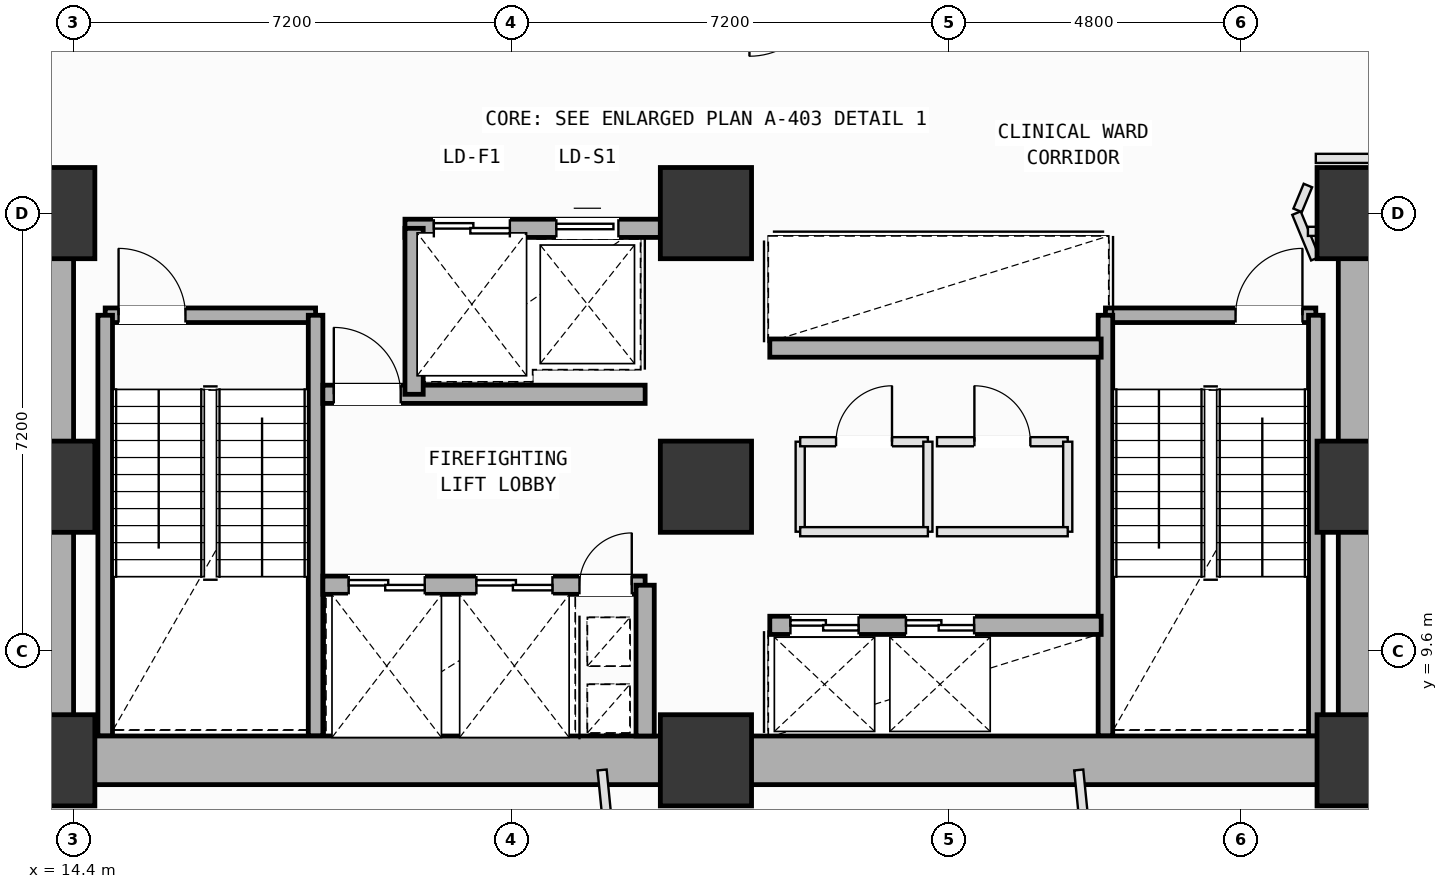
"""IFC4 building model, lengths in metres.
Left out: names, types, materials, properties, quantities, classifications, styles, units other than length and angle.
Written with IfcOpenShell. Run it as: python <this file> out.ifc"""

import sys

from ifc_helpers import new_model, si_unit, direction, frame, frame_2d, origin, origin_2d, place, context, subcontext, project, spatial, rectangle, extrude, element, fill, save


model = new_model("IFC4")
c1 = context("Model", 3, precision=1e-05, world=origin(), true_north=direction((0.0, 1.0)))
c2 = subcontext(c1, "Body", "Model", "MODEL_VIEW")
j1 = project(units=[si_unit("LENGTHUNIT", "METRE"), si_unit("PLANEANGLEUNIT", "RADIAN")], contexts=[c1])
p1 = place(None, origin())
s1 = spatial("IfcSite", under=j1, at=p1, CompositionType="ELEMENT")
p2 = place(p1, origin())
s2 = spatial("IfcBuilding", under=s1, at=p2, CompositionType="ELEMENT")
p3 = place(p2, frame((0.0, 0.0, 47.0)))
s3 = spatial("IfcBuildingStorey", under=s2, at=p3, CompositionType="ELEMENT", Elevation=47.0)
for number, where, z_axis, x_axis in (
    (1, (14.0, 7.8, 0.0), (0.0, 0.0, 1.0), (1.0, 0.0, 0.0)),
    (2, (14.0, 12.3, 0.0), (0.0, 0.0, 1.0), (1.0, 0.0, 0.0)),
    (3, (14.0, 16.8, 0.0), (0.0, 0.0, 1.0), (1.0, 0.0, 0.0)),
    (4, (24.8, 7.8, 0.0), (0.0, 0.0, 1.0), (1.0, 0.0, 0.0)),
    (5, (24.8, 12.3, 0.0), (0.0, 0.0, 1.0), (1.0, 0.0, 0.0)),
    (6, (24.8, 16.8, 0.0), (0.0, 0.0, 1.0), (1.0, 0.0, 0.0)),
    (7, (35.6, 7.8, 0.0), (0.0, 0.0, 1.0), (1.0, 0.0, 0.0)),
    (8, (35.6, 12.3, 0.0), (0.0, 0.0, 1.0), (1.0, 0.0, 0.0)),
    (9, (35.6, 16.8, 0.0), (0.0, 0.0, 1.0), (1.0, 0.0, 0.0)),
):
    element("IfcColumn", number, at=place(p3, frame(where, z_axis=z_axis, x_axis=x_axis)), inside=s3, PredefinedType="COLUMN", context=c2, shape_type="SweptSolid", body=[
        extrude(rectangle(XDim=1.5, YDim=1.5, at=origin_2d()), origin(), (0.0, 0.0, 1.0), 4.0),
    ])
p4 = place(p3, frame((14.92, 15.12, 0.0), z_axis=(0.0, 0.0, 1.0), x_axis=(1.0, 0.0, 0.0)))
e10 = element("IfcWall", 10, at=p4, inside=s3, PredefinedType="SOLIDWALL", context=c2, shape_type="SweptSolid", body=[
    extrude(rectangle(XDim=3.46, YDim=0.24, at=frame_2d((1.73, 0.0))), origin(), (0.0, 0.0, 1.0), 3.78),
])
p5 = place(p4, frame((0.22, 0.0, 0.0)))
e11 = element("IfcOpeningElement", 11, at=p5, cuts=e10, PredefinedType="OPENING", context=c2, shape_type="SweptSolid", body=[
    extrude(rectangle(XDim=1.1, YDim=2.15, at=frame_2d((0.55, 1.075))), frame((0.0, 0.13, 0.0), z_axis=(0.0, -1.0, 0.0), x_axis=(1.0, 0.0, 0.0)), (0.0, 0.0, 1.0), 0.26),
])
for number, where, z_axis, x_axis in (
    (12, (18.38, 15.12, 0.0), (0.0, 0.0, 1.0), (0.0, -1.0, 0.0)),
    (13, (14.92, 8.2, 0.0), (0.0, 0.0, 1.0), (0.0, 1.0, 0.0)),
):
    element("IfcWall", number, at=place(p3, frame(where, z_axis=z_axis, x_axis=x_axis)), inside=s3, PredefinedType="SOLIDWALL", context=c2, shape_type="SweptSolid", body=[
        extrude(rectangle(XDim=6.92, YDim=0.24, at=frame_2d((3.46, 0.0))), origin(), (0.0, 0.0, 1.0), 3.78),
    ])
p6 = place(p3, frame((31.37, 15.12, 0.0), z_axis=(0.0, 0.0, 1.0), x_axis=(1.0, 0.0, 0.0)))
e14 = element("IfcWall", 14, at=p6, inside=s3, PredefinedType="SOLIDWALL", context=c2, shape_type="SweptSolid", body=[
    extrude(rectangle(XDim=3.46, YDim=0.24, at=frame_2d((1.73, 0.0))), origin(), (0.0, 0.0, 1.0), 3.78),
])
p7 = place(p6, frame((2.14, 0.0, 0.0)))
e15 = element("IfcOpeningElement", 15, at=p7, cuts=e14, PredefinedType="OPENING", context=c2, shape_type="SweptSolid", body=[
    extrude(rectangle(XDim=1.1, YDim=2.15, at=frame_2d((0.55, 1.075))), frame((0.0, 0.13, 0.0), z_axis=(0.0, -1.0, 0.0), x_axis=(1.0, 0.0, 0.0)), (0.0, 0.0, 1.0), 0.26),
])
for number, where, z_axis, x_axis in (
    (16, (34.83, 15.12, 0.0), (0.0, 0.0, 1.0), (0.0, -1.0, 0.0)),
    (17, (31.37, 8.2, 0.0), (0.0, 0.0, 1.0), (0.0, 1.0, 0.0)),
):
    element("IfcWall", number, at=place(p3, frame(where, z_axis=z_axis, x_axis=x_axis)), inside=s3, PredefinedType="SOLIDWALL", context=c2, shape_type="SweptSolid", body=[
        extrude(rectangle(XDim=6.92, YDim=0.24, at=frame_2d((3.46, 0.0))), origin(), (0.0, 0.0, 1.0), 3.78),
    ])
for number, where, z_axis, x_axis in (
    (18, (14.0, 7.8, 0.0), (0.0, 0.0, 1.0), (1.0, 0.0, 0.0)),
    (19, (24.8, 7.8, 0.0), (0.0, 0.0, 1.0), (1.0, 0.0, 0.0)),
):
    element("IfcWall", number, at=place(p3, frame(where, z_axis=z_axis, x_axis=x_axis)), inside=s3, PredefinedType="SHEAR", context=c2, shape_type="SweptSolid", body=[
        extrude(rectangle(XDim=10.8, YDim=0.8, at=frame_2d((5.4, 0.0))), origin(), (0.0, 0.0, 1.0), 3.78),
    ])
for number, where, z_axis, x_axis in (
    (20, (35.6, 7.8, 0.0), (0.0, 0.0, 1.0), (0.0, 1.0, 0.0)),
    (21, (14.0, 16.8, 0.0), (0.0, 0.0, 1.0), (0.0, -1.0, 0.0)),
):
    element("IfcWall", number, at=place(p3, frame(where, z_axis=z_axis, x_axis=x_axis)), inside=s3, PredefinedType="SHEAR", context=c2, shape_type="SweptSolid", body=[
        extrude(rectangle(XDim=9.0, YDim=0.8, at=frame_2d((4.5, 0.0))), origin(), (0.0, 0.0, 1.0), 3.78),
    ])
p8 = place(p3, frame((19.85, 16.55, 0.0), z_axis=(0.0, 0.0, 1.0), x_axis=(1.0, 0.0, 0.0)))
e22 = element("IfcWall", 22, at=p8, inside=s3, PredefinedType="SOLIDWALL", context=c2, shape_type="SweptSolid", body=[
    extrude(rectangle(XDim=4.2, YDim=0.3, at=frame_2d((2.1, 0.0))), origin(), (0.0, 0.0, 1.0), 3.78),
])
p9 = place(p8, frame((0.475, 0.0, 0.0)))
e23 = element("IfcOpeningElement", 23, at=p9, cuts=e22, PredefinedType="OPENING", context=c2, shape_type="SweptSolid", body=[
    extrude(rectangle(XDim=1.25, YDim=2.18, at=frame_2d((0.625, 1.09))), frame((0.0, 0.16, 0.0), z_axis=(0.0, -1.0, 0.0), x_axis=(1.0, 0.0, 0.0)), (0.0, 0.0, 1.0), 0.32),
])
p10 = place(p8, frame((2.49, 0.0, 0.0)))
e24 = element("IfcOpeningElement", 24, at=p10, cuts=e22, PredefinedType="OPENING", context=c2, shape_type="SweptSolid", body=[
    extrude(rectangle(XDim=1.02, YDim=2.12, at=frame_2d((0.51, 1.06))), frame((0.0, 0.16, 0.0), z_axis=(0.0, -1.0, 0.0), x_axis=(1.0, 0.0, 0.0)), (0.0, 0.0, 1.0), 0.32),
])
p11 = place(p3, frame((18.5, 10.68, 0.0), z_axis=(0.0, 0.0, 1.0), x_axis=(1.0, 0.0, 0.0)))
e25 = element("IfcWall", 25, at=p11, inside=s3, PredefinedType="SOLIDWALL", context=c2, shape_type="SweptSolid", body=[
    extrude(rectangle(XDim=5.3, YDim=0.3, at=frame_2d((2.65, 0.0))), origin(), (0.0, 0.0, 1.0), 3.78),
])
p12 = place(p11, frame((4.22, 0.0, 0.0)))
e26 = element("IfcOpeningElement", 26, at=p12, cuts=e25, PredefinedType="OPENING", context=c2, shape_type="SweptSolid", body=[
    extrude(rectangle(XDim=0.86, YDim=2.06, at=frame_2d((0.43, 1.03))), frame((0.0, 0.16, 0.0), z_axis=(0.0, -1.0, 0.0), x_axis=(1.0, 0.0, 0.0)), (0.0, 0.0, 1.0), 0.32),
])
p13 = place(p11, frame((0.425, 0.0, 0.0)))
e27 = element("IfcOpeningElement", 27, at=p13, cuts=e25, PredefinedType="OPENING", context=c2, shape_type="SweptSolid", body=[
    extrude(rectangle(XDim=1.25, YDim=2.18, at=frame_2d((0.625, 1.09))), frame((0.0, 0.16, 0.0), z_axis=(0.0, -1.0, 0.0), x_axis=(1.0, 0.0, 0.0)), (0.0, 0.0, 1.0), 0.32),
])
p14 = place(p11, frame((2.525, 0.0, 0.0)))
e28 = element("IfcOpeningElement", 28, at=p14, cuts=e25, PredefinedType="OPENING", context=c2, shape_type="SweptSolid", body=[
    extrude(rectangle(XDim=1.25, YDim=2.18, at=frame_2d((0.625, 1.09))), frame((0.0, 0.16, 0.0), z_axis=(0.0, -1.0, 0.0), x_axis=(1.0, 0.0, 0.0)), (0.0, 0.0, 1.0), 0.32),
])
p15 = place(p3, frame((18.5, 13.82, 0.0), z_axis=(0.0, 0.0, 1.0), x_axis=(1.0, 0.0, 0.0)))
e29 = element("IfcWall", 29, at=p15, inside=s3, PredefinedType="SOLIDWALL", context=c2, shape_type="SweptSolid", body=[
    extrude(rectangle(XDim=5.3, YDim=0.3, at=frame_2d((2.65, 0.0))), origin(), (0.0, 0.0, 1.0), 3.78),
])
p16 = place(p15, frame((0.18, 0.0, 0.0)))
e30 = element("IfcOpeningElement", 30, at=p16, cuts=e29, PredefinedType="OPENING", context=c2, shape_type="SweptSolid", body=[
    extrude(rectangle(XDim=1.1, YDim=2.15, at=frame_2d((0.55, 1.075))), frame((0.0, 0.16, 0.0), z_axis=(0.0, -1.0, 0.0), x_axis=(1.0, 0.0, 0.0)), (0.0, 0.0, 1.0), 0.32),
])
p17 = place(p3, frame((23.8, 8.2, 0.0), z_axis=(0.0, 0.0, 1.0), x_axis=(0.0, 1.0, 0.0)))
e31 = element("IfcWall", 31, at=p17, inside=s3, PredefinedType="SOLIDWALL", context=c2, shape_type="SweptSolid", body=[
    extrude(rectangle(XDim=2.48, YDim=0.3, at=frame_2d((1.24, 0.0))), origin(), (0.0, 0.0, 1.0), 3.78),
])
p18 = place(p3, frame((20.0, 13.82, 0.0), z_axis=(0.0, 0.0, 1.0), x_axis=(0.0, 1.0, 0.0)))
e32 = element("IfcWall", 32, at=p18, inside=s3, PredefinedType="SOLIDWALL", context=c2, shape_type="SweptSolid", body=[
    extrude(rectangle(XDim=2.73, YDim=0.3, at=frame_2d((1.365, 0.0))), origin(), (0.0, 0.0, 1.0), 3.78),
])
p19 = place(p3, frame((25.85, 10.02, 0.0), z_axis=(0.0, 0.0, 1.0), x_axis=(1.0, 0.0, 0.0)))
e33 = element("IfcWall", 33, at=p19, inside=s3, PredefinedType="SOLIDWALL", context=c2, shape_type="SweptSolid", body=[
    extrude(rectangle(XDim=5.45, YDim=0.3, at=frame_2d((2.725, 0.0))), origin(), (0.0, 0.0, 1.0), 3.78),
])
p20 = place(p19, frame((0.34, 0.0, 0.0)))
e34 = element("IfcOpeningElement", 34, at=p20, cuts=e33, PredefinedType="OPENING", context=c2, shape_type="SweptSolid", body=[
    extrude(rectangle(XDim=1.12, YDim=2.15, at=frame_2d((0.56, 1.075))), frame((0.0, 0.16, 0.0), z_axis=(0.0, -1.0, 0.0), x_axis=(1.0, 0.0, 0.0)), (0.0, 0.0, 1.0), 0.32),
])
p21 = place(p19, frame((2.24, 0.0, 0.0)))
e35 = element("IfcOpeningElement", 35, at=p21, cuts=e33, PredefinedType="OPENING", context=c2, shape_type="SweptSolid", body=[
    extrude(rectangle(XDim=1.12, YDim=2.15, at=frame_2d((0.56, 1.075))), frame((0.0, 0.16, 0.0), z_axis=(0.0, -1.0, 0.0), x_axis=(1.0, 0.0, 0.0)), (0.0, 0.0, 1.0), 0.32),
])
p22 = place(p3, frame((25.85, 14.58, 0.0), z_axis=(0.0, 0.0, 1.0), x_axis=(1.0, 0.0, 0.0)))
e36 = element("IfcWall", 36, at=p22, inside=s3, PredefinedType="SOLIDWALL", context=c2, shape_type="SweptSolid", body=[
    extrude(rectangle(XDim=5.45, YDim=0.3, at=frame_2d((2.725, 0.0))), origin(), (0.0, 0.0, 1.0), 3.78),
])
p23 = place(p3, frame((26.35, 11.56, 0.0), z_axis=(0.0, 0.0, 1.0), x_axis=(0.0, 1.0, 0.0)))
e37 = element("IfcWall", 37, at=p23, inside=s3, PredefinedType="PARTITIONING", context=c2, shape_type="SweptSolid", body=[
    extrude(rectangle(XDim=1.48, YDim=0.15, at=frame_2d((0.74, 0.0))), origin(), (0.0, 0.0, 1.0), 3.78),
])
p24 = place(p3, frame((26.35, 13.04, 0.0), z_axis=(0.0, 0.0, 1.0), x_axis=(1.0, 0.0, 0.0)))
e38 = element("IfcWall", 38, at=p24, inside=s3, PredefinedType="PARTITIONING", context=c2, shape_type="SweptSolid", body=[
    extrude(rectangle(XDim=2.1, YDim=0.15, at=frame_2d((1.05, 0.0))), origin(), (0.0, 0.0, 1.0), 3.78),
])
p25 = place(p24, frame((0.59, 0.0, 0.0)))
e39 = element("IfcOpeningElement", 39, at=p25, cuts=e38, PredefinedType="OPENING", context=c2, shape_type="SweptSolid", body=[
    extrude(rectangle(XDim=0.92, YDim=2.1, at=frame_2d((0.46, 1.05))), frame((0.0, 0.085, 0.0), z_axis=(0.0, -1.0, 0.0), x_axis=(1.0, 0.0, 0.0)), (0.0, 0.0, 1.0), 0.17),
])
p26 = place(p3, frame((28.45, 13.04, 0.0), z_axis=(0.0, 0.0, 1.0), x_axis=(0.0, -1.0, 0.0)))
e40 = element("IfcWall", 40, at=p26, inside=s3, PredefinedType="PARTITIONING", context=c2, shape_type="SweptSolid", body=[
    extrude(rectangle(XDim=1.48, YDim=0.15, at=frame_2d((0.74, 0.0))), origin(), (0.0, 0.0, 1.0), 3.78),
])
p27 = place(p3, frame((28.45, 11.56, 0.0), z_axis=(0.0, 0.0, 1.0), x_axis=(-1.0, 0.0, 0.0)))
e41 = element("IfcWall", 41, at=p27, inside=s3, PredefinedType="PARTITIONING", context=c2, shape_type="SweptSolid", body=[
    extrude(rectangle(XDim=2.1, YDim=0.15, at=frame_2d((1.05, 0.0))), origin(), (0.0, 0.0, 1.0), 3.78),
])
p28 = place(p3, frame((28.6, 13.04, 0.0), z_axis=(0.0, 0.0, 1.0), x_axis=(1.0, 0.0, 0.0)))
e42 = element("IfcWall", 42, at=p28, inside=s3, PredefinedType="PARTITIONING", context=c2, shape_type="SweptSolid", body=[
    extrude(rectangle(XDim=2.15, YDim=0.15, at=frame_2d((1.075, 0.0))), origin(), (0.0, 0.0, 1.0), 3.78),
])
p29 = place(p28, frame((0.615, 0.0, 0.0)))
e43 = element("IfcOpeningElement", 43, at=p29, cuts=e42, PredefinedType="OPENING", context=c2, shape_type="SweptSolid", body=[
    extrude(rectangle(XDim=0.92, YDim=2.1, at=frame_2d((0.46, 1.05))), frame((0.0, 0.085, 0.0), z_axis=(0.0, -1.0, 0.0), x_axis=(1.0, 0.0, 0.0)), (0.0, 0.0, 1.0), 0.17),
])
p30 = place(p3, frame((30.75, 13.04, 0.0), z_axis=(0.0, 0.0, 1.0), x_axis=(0.0, -1.0, 0.0)))
e44 = element("IfcWall", 44, at=p30, inside=s3, PredefinedType="PARTITIONING", context=c2, shape_type="SweptSolid", body=[
    extrude(rectangle(XDim=1.48, YDim=0.15, at=frame_2d((0.74, 0.0))), origin(), (0.0, 0.0, 1.0), 3.78),
])
p31 = place(p3, frame((30.75, 11.56, 0.0), z_axis=(0.0, 0.0, 1.0), x_axis=(-1.0, 0.0, 0.0)))
e45 = element("IfcWall", 45, at=p31, inside=s3, PredefinedType="PARTITIONING", context=c2, shape_type="SweptSolid", body=[
    extrude(rectangle(XDim=2.15, YDim=0.15, at=frame_2d((1.075, 0.0))), origin(), (0.0, 0.0, 1.0), 3.78),
])
p32 = place(p3, frame((23.092, 7.641, 0.0), z_axis=(0.0, 0.0, 1.0), x_axis=(0.099432207096, -0.995044338807, 0.0)))
e46 = element("IfcWall", 46, at=p32, inside=s3, PredefinedType="PARTITIONING", context=c2, shape_type="SweptSolid", body=[
    extrude(rectangle(XDim=6.084, YDim=0.15, at=frame_2d((3.042, 0.0))), origin(), (0.0, 0.0, 1.0), 3.78),
])
p33 = place(p32, frame((2.763, 0.0, 0.0)))
e47 = element("IfcOpeningElement", 47, at=p33, cuts=e46, PredefinedType="OPENING", context=c2, shape_type="SweptSolid", body=[
    extrude(rectangle(XDim=0.86, YDim=2.06, at=frame_2d((0.43, 1.03))), frame((0.0, 0.085, 0.0), z_axis=(0.0, -1.0, 0.0), x_axis=(1.0, 0.0, 0.0)), (0.0, 0.0, 1.0), 0.17),
])
p34 = place(p3, frame((30.931, 7.641, 0.0), z_axis=(0.0, 0.0, 1.0), x_axis=(0.099335166826, -0.995054031011, 0.0)))
e48 = element("IfcWall", 48, at=p34, inside=s3, PredefinedType="PARTITIONING", context=c2, shape_type="SweptSolid", body=[
    extrude(rectangle(XDim=5.306, YDim=0.15, at=frame_2d((2.653, 0.0))), origin(), (0.0, 0.0, 1.0), 3.78),
])
p35 = place(p34, frame((2.374, 0.0, 0.0)))
e49 = element("IfcOpeningElement", 49, at=p35, cuts=e48, PredefinedType="OPENING", context=c2, shape_type="SweptSolid", body=[
    extrude(rectangle(XDim=0.86, YDim=2.06, at=frame_2d((0.43, 1.03))), frame((0.0, 0.085, 0.0), z_axis=(0.0, -1.0, 0.0), x_axis=(1.0, 0.0, 0.0)), (0.0, 0.0, 1.0), 0.17),
])
p36 = place(p3, frame((34.822, 16.05, 0.0), z_axis=(0.0, 0.0, 1.0), x_axis=(-0.382050639738, 0.924141389981, 0.0)))
e50 = element("IfcWall", 50, at=p36, inside=s3, PredefinedType="PARTITIONING", context=c2, shape_type="SweptSolid", body=[
    extrude(rectangle(XDim=0.812, YDim=0.15, at=frame_2d((0.406, 0.0))), origin(), (0.0, 0.0, 1.0), 3.78),
])
p37 = place(p3, frame((34.531, 16.846, 0.0), z_axis=(0.0, 0.0, 1.0), x_axis=(0.382612233621, 0.923909020782, 0.0)))
e51 = element("IfcWall", 51, at=p37, inside=s3, PredefinedType="PARTITIONING", context=c2, shape_type="SweptSolid", body=[
    extrude(rectangle(XDim=0.442, YDim=0.15, at=frame_2d((0.221, 0.0))), origin(), (0.0, 0.0, 1.0), 3.78),
])
p38 = place(p3, frame((34.7, 16.5, 0.0), z_axis=(0.0, 0.0, 1.0), x_axis=(1.0, 0.0, 0.0)))
e52 = element("IfcWall", 52, at=p38, inside=s3, PredefinedType="PARTITIONING", context=c2, shape_type="SweptSolid", body=[
    extrude(rectangle(XDim=0.525, YDim=0.15, at=frame_2d((0.263, 0.0))), origin(), (0.0, 0.0, 1.0), 2.865),
])
p39 = place(p3, frame((36.45, 17.7, 0.0), z_axis=(0.0, 0.0, 1.0), x_axis=(-1.0, 0.0, 0.0)))
e53 = element("IfcWall", 53, at=p39, inside=s3, PredefinedType="PARTITIONING", context=c2, shape_type="SweptSolid", body=[
    extrude(rectangle(XDim=1.62, YDim=0.15, at=frame_2d((0.81, 0.0))), origin(), (0.0, 0.0, 1.0), 3.78),
])
p40 = place(p5, origin())
e54 = element("IfcDoor", 54, at=p40, inside=s3, OperationType="SINGLE_SWING_LEFT", PredefinedType="DOOR", context=c2, shape_type="SweptSolid", body=[
    extrude(rectangle(XDim=1.1, YDim=2.15, at=frame_2d((0.55, 1.075))), frame((0.0, 0.025, 0.0), z_axis=(0.0, -1.0, 0.0), x_axis=(1.0, 0.0, 0.0)), (0.0, 0.0, 1.0), 0.05),
])
fill(e11, e54)
p41 = place(p7, origin())
e55 = element("IfcDoor", 55, at=p41, inside=s3, OperationType="SINGLE_SWING_RIGHT", PredefinedType="DOOR", context=c2, shape_type="SweptSolid", body=[
    extrude(rectangle(XDim=1.1, YDim=2.15, at=frame_2d((0.55, 1.075))), frame((0.0, 0.025, 0.0), z_axis=(0.0, -1.0, 0.0), x_axis=(1.0, 0.0, 0.0)), (0.0, 0.0, 1.0), 0.05),
])
fill(e15, e55)
p42 = place(p12, origin())
e56 = element("IfcDoor", 56, at=p42, inside=s3, OperationType="SINGLE_SWING_RIGHT", PredefinedType="DOOR", context=c2, shape_type="SweptSolid", body=[
    extrude(rectangle(XDim=0.86, YDim=2.06, at=frame_2d((0.43, 1.03))), frame((0.0, 0.025, 0.0), z_axis=(0.0, -1.0, 0.0), x_axis=(1.0, 0.0, 0.0)), (0.0, 0.0, 1.0), 0.05),
])
fill(e26, e56)
p43 = place(p16, origin())
e57 = element("IfcDoor", 57, at=p43, inside=s3, OperationType="SINGLE_SWING_LEFT", PredefinedType="DOOR", context=c2, shape_type="SweptSolid", body=[
    extrude(rectangle(XDim=1.1, YDim=2.15, at=frame_2d((0.55, 1.075))), frame((0.0, 0.025, 0.0), z_axis=(0.0, -1.0, 0.0), x_axis=(1.0, 0.0, 0.0)), (0.0, 0.0, 1.0), 0.05),
])
fill(e30, e57)
p44 = place(p13, origin())
e58 = element("IfcDoor", 58, at=p44, inside=s3, OperationType="DOUBLE_DOOR_SLIDING", PredefinedType="DOOR", context=c2, shape_type="SweptSolid", body=[
    extrude(rectangle(XDim=1.25, YDim=2.18, at=frame_2d((0.625, 1.09))), frame((0.0, 0.025, 0.0), z_axis=(0.0, -1.0, 0.0), x_axis=(1.0, 0.0, 0.0)), (0.0, 0.0, 1.0), 0.05),
])
fill(e27, e58)
p45 = place(p14, origin())
e59 = element("IfcDoor", 59, at=p45, inside=s3, OperationType="DOUBLE_DOOR_SLIDING", PredefinedType="DOOR", context=c2, shape_type="SweptSolid", body=[
    extrude(rectangle(XDim=1.25, YDim=2.18, at=frame_2d((0.625, 1.09))), frame((0.0, 0.025, 0.0), z_axis=(0.0, -1.0, 0.0), x_axis=(1.0, 0.0, 0.0)), (0.0, 0.0, 1.0), 0.05),
])
fill(e28, e59)
p46 = place(p20, origin())
e60 = element("IfcDoor", 60, at=p46, inside=s3, OperationType="DOUBLE_DOOR_SLIDING", PredefinedType="DOOR", context=c2, shape_type="SweptSolid", body=[
    extrude(rectangle(XDim=1.12, YDim=2.15, at=frame_2d((0.56, 1.075))), frame((0.0, 0.025, 0.0), z_axis=(0.0, -1.0, 0.0), x_axis=(1.0, 0.0, 0.0)), (0.0, 0.0, 1.0), 0.05),
])
fill(e34, e60)
p47 = place(p21, origin())
e61 = element("IfcDoor", 61, at=p47, inside=s3, OperationType="DOUBLE_DOOR_SLIDING", PredefinedType="DOOR", context=c2, shape_type="SweptSolid", body=[
    extrude(rectangle(XDim=1.12, YDim=2.15, at=frame_2d((0.56, 1.075))), frame((0.0, 0.025, 0.0), z_axis=(0.0, -1.0, 0.0), x_axis=(1.0, 0.0, 0.0)), (0.0, 0.0, 1.0), 0.05),
])
fill(e35, e61)
p48 = place(p9, origin())
e62 = element("IfcDoor", 62, at=p48, inside=s3, OperationType="DOUBLE_DOOR_SLIDING", PredefinedType="DOOR", context=c2, shape_type="SweptSolid", body=[
    extrude(rectangle(XDim=1.25, YDim=2.18, at=frame_2d((0.625, 1.09))), frame((0.0, 0.025, 0.0), z_axis=(0.0, -1.0, 0.0), x_axis=(1.0, 0.0, 0.0)), (0.0, 0.0, 1.0), 0.05),
])
fill(e23, e62)
p49 = place(p10, origin())
e63 = element("IfcDoor", 63, at=p49, inside=s3, OperationType="SLIDING_TO_LEFT", PredefinedType="DOOR", context=c2, shape_type="SweptSolid", body=[
    extrude(rectangle(XDim=1.02, YDim=2.12, at=frame_2d((0.51, 1.06))), frame((0.0, 0.025, 0.0), z_axis=(0.0, -1.0, 0.0), x_axis=(1.0, 0.0, 0.0)), (0.0, 0.0, 1.0), 0.05),
])
fill(e24, e63)
p50 = place(p25, origin())
e64 = element("IfcDoor", 64, at=p50, inside=s3, OperationType="SINGLE_SWING_RIGHT", PredefinedType="DOOR", context=c2, shape_type="SweptSolid", body=[
    extrude(rectangle(XDim=0.92, YDim=2.1, at=frame_2d((0.46, 1.05))), frame((0.0, 0.025, 0.0), z_axis=(0.0, -1.0, 0.0), x_axis=(1.0, 0.0, 0.0)), (0.0, 0.0, 1.0), 0.05),
])
fill(e39, e64)
p51 = place(p29, origin())
e65 = element("IfcDoor", 65, at=p51, inside=s3, OperationType="SINGLE_SWING_LEFT", PredefinedType="DOOR", context=c2, shape_type="SweptSolid", body=[
    extrude(rectangle(XDim=0.92, YDim=2.1, at=frame_2d((0.46, 1.05))), frame((0.0, 0.025, 0.0), z_axis=(0.0, -1.0, 0.0), x_axis=(1.0, 0.0, 0.0)), (0.0, 0.0, 1.0), 0.05),
])
fill(e43, e65)
save(model, sys.argv[1])
